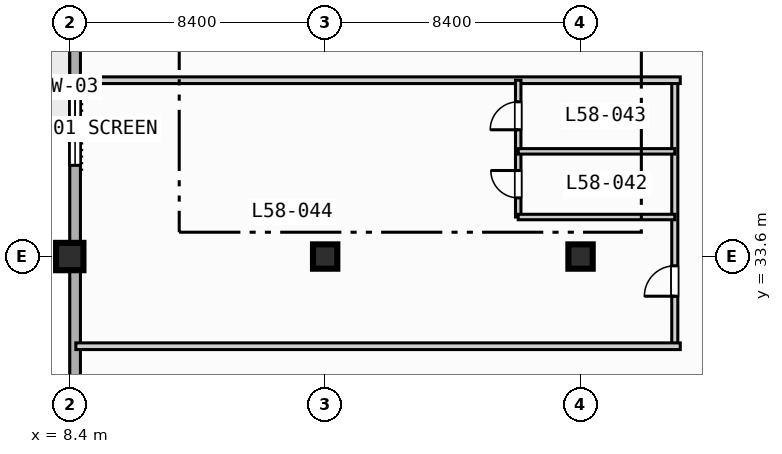
"""IFC4 building model, lengths in metres.
Left out: names, types, materials, properties, quantities, classifications, styles, units other than length and angle.
Written with IfcOpenShell. Run it as: python <this file> out.ifc"""

import sys

from ifc_helpers import new_model, si_unit, direction, frame, frame_2d, origin, origin_2d, place, context, subcontext, project, spatial, rectangle, extrude, element, fill, save


model = new_model("IFC4")
c1 = context("Model", 3, precision=1e-05, world=origin(), true_north=direction((0.0, 1.0)))
c2 = subcontext(c1, "Body", "Model", "MODEL_VIEW")
j1 = project(units=[si_unit("LENGTHUNIT", "METRE"), si_unit("PLANEANGLEUNIT", "RADIAN")], contexts=[c1])
p1 = place(None, origin())
s1 = spatial("IfcSite", under=j1, at=p1, CompositionType="ELEMENT")
p2 = place(p1, origin())
s2 = spatial("IfcBuilding", under=s1, at=p2, CompositionType="ELEMENT")
p3 = place(p2, frame((0.0, 0.0, 237.9)))
s3 = spatial("IfcBuildingStorey", under=s2, at=p3, CompositionType="ELEMENT", Elevation=237.9)
p4 = place(p3, frame((8.4, 33.6, 0.0), z_axis=(0.0, 0.0, 1.0), x_axis=(1.0, 0.0, 0.0)))
e1 = element("IfcColumn", 1, at=p4, inside=s3, PredefinedType="COLUMN", context=c2, shape_type="SweptSolid", body=[
    extrude(rectangle(XDim=0.9, YDim=0.9, at=origin_2d()), origin(), (0.0, 0.0, 1.0), 3.7),
])
for number, where, z_axis, x_axis in (
    (2, (16.8, 33.6, 0.0), (0.0, 0.0, 1.0), (1.0, 0.0, 0.0)),
    (3, (25.2, 33.6, 0.0), (0.0, 0.0, 1.0), (1.0, 0.0, 0.0)),
):
    element("IfcColumn", number, at=place(p3, frame(where, z_axis=z_axis, x_axis=x_axis)), inside=s3, PredefinedType="COLUMN", context=c2, shape_type="SweptSolid", body=[
        extrude(rectangle(XDim=0.8, YDim=0.8, at=origin_2d()), origin(), (0.0, 0.0, 1.0), 3.7),
    ])
p5 = place(p3, frame((8.575, 11.575, 0.0), z_axis=(0.0, 0.0, 1.0), x_axis=(0.0, 1.0, 0.0)))
e4 = element("IfcWall", 4, at=p5, inside=s3, PredefinedType="STANDARD", context=c2, shape_type="SweptSolid", body=[
    extrude(rectangle(XDim=60.85, YDim=0.35, at=frame_2d((30.425, 0.0))), origin(), (0.0, 0.0, 1.0), 3.47),
])
p6 = place(p5, frame((33.925, 0.0, 0.0)))
e5 = element("IfcOpeningElement", 5, at=p6, cuts=e4, PredefinedType="OPENING", context=c2, shape_type="SweptSolid", body=[
    extrude(rectangle(XDim=1.4, YDim=2.2, at=frame_2d((0.7, 1.1))), frame((0.0, 0.185, 0.0), z_axis=(0.0, -1.0, 0.0), x_axis=(1.0, 0.0, 0.0)), (0.0, 0.0, 1.0), 0.37),
])
p7 = place(p5, frame((25.025, 0.0, 0.85)))
e6 = element("IfcOpeningElement", 6, at=p7, cuts=e4, PredefinedType="OPENING", context=c2, shape_type="SweptSolid", body=[
    extrude(rectangle(XDim=2.4, YDim=1.95, at=frame_2d((1.2, 0.975))), frame((0.0, 0.185, 0.0), z_axis=(0.0, -1.0, 0.0), x_axis=(1.0, 0.0, 0.0)), (0.0, 0.0, 1.0), 0.37),
])
p8 = place(p5, frame((41.825, 0.0, 0.85)))
e7 = element("IfcOpeningElement", 7, at=p8, cuts=e4, PredefinedType="OPENING", context=c2, shape_type="SweptSolid", body=[
    extrude(rectangle(XDim=2.4, YDim=1.95, at=frame_2d((1.2, 0.975))), frame((0.0, 0.185, 0.0), z_axis=(0.0, -1.0, 0.0), x_axis=(1.0, 0.0, 0.0)), (0.0, 0.0, 1.0), 0.37),
])
p9 = place(p3, frame((28.3, 30.65, 0.0), z_axis=(0.0, 0.0, 1.0), x_axis=(0.0, 1.0, 0.0)))
e8 = element("IfcWall", 8, at=p9, inside=s3, PredefinedType="PARTITIONING", context=c2, shape_type="SweptSolid", body=[
    extrude(rectangle(XDim=8.75, YDim=0.2, at=frame_2d((4.375, 0.0))), origin(), (0.0, 0.0, 1.0), 3.47),
])
p10 = place(p9, frame((1.645, 0.0, 0.0)))
e9 = element("IfcOpeningElement", 9, at=p10, cuts=e8, PredefinedType="OPENING", context=c2, shape_type="SweptSolid", body=[
    extrude(rectangle(XDim=1.0, YDim=2.15, at=frame_2d((0.5, 1.075))), frame((0.0, 0.11, 0.0), z_axis=(0.0, -1.0, 0.0), x_axis=(1.0, 0.0, 0.0)), (0.0, 0.0, 1.0), 0.22),
])
for number, where, z_axis, x_axis in (
    (10, (8.6, 30.65, 0.0), (0.0, 0.0, 1.0), (1.0, 0.0, 0.0)),
    (11, (8.6, 39.4, 0.0), (0.0, 0.0, 1.0), (1.0, 0.0, 0.0)),
):
    element("IfcWall", number, at=place(p3, frame(where, z_axis=z_axis, x_axis=x_axis)), inside=s3, PredefinedType="PARTITIONING", context=c2, shape_type="SweptSolid", body=[
        extrude(rectangle(XDim=19.88, YDim=0.22, at=frame_2d((9.94, 0.0))), origin(), (0.0, 0.0, 1.0), 3.47),
    ])
p11 = place(p3, frame((23.15, 34.9, 0.0), z_axis=(0.0, 0.0, 1.0), x_axis=(0.0, 1.0, 0.0)))
e12 = element("IfcWall", 12, at=p11, inside=s3, PredefinedType="PLUMBINGWALL", context=c2, shape_type="SweptSolid", body=[
    extrude(rectangle(XDim=4.5, YDim=0.18, at=frame_2d((2.25, 0.0))), origin(), (0.0, 0.0, 1.0), 3.47),
])
p12 = place(p11, frame((0.63, 0.0, 0.0)))
e13 = element("IfcOpeningElement", 13, at=p12, cuts=e12, PredefinedType="OPENING", context=c2, shape_type="SweptSolid", body=[
    extrude(rectangle(XDim=0.9, YDim=2.1, at=frame_2d((0.45, 1.05))), frame((0.0, 0.1, 0.0), z_axis=(0.0, -1.0, 0.0), x_axis=(1.0, 0.0, 0.0)), (0.0, 0.0, 1.0), 0.2),
])
p13 = place(p11, frame((2.87, 0.0, 0.0)))
e14 = element("IfcOpeningElement", 14, at=p13, cuts=e12, PredefinedType="OPENING", context=c2, shape_type="SweptSolid", body=[
    extrude(rectangle(XDim=0.92, YDim=2.1, at=frame_2d((0.46, 1.05))), frame((0.0, 0.1, 0.0), z_axis=(0.0, -1.0, 0.0), x_axis=(1.0, 0.0, 0.0)), (0.0, 0.0, 1.0), 0.2),
])
for number, where, z_axis, x_axis in (
    (15, (23.15, 34.9, 0.0), (0.0, 0.0, 1.0), (1.0, 0.0, 0.0)),
    (16, (23.15, 37.06, 0.0), (0.0, 0.0, 1.0), (1.0, 0.0, 0.0)),
):
    element("IfcWall", number, at=place(p3, frame(where, z_axis=z_axis, x_axis=x_axis)), inside=s3, PredefinedType="PLUMBINGWALL", context=c2, shape_type="SweptSolid", body=[
        extrude(rectangle(XDim=5.15, YDim=0.18, at=frame_2d((2.575, 0.0))), origin(), (0.0, 0.0, 1.0), 3.47),
    ])
p14 = place(p7, origin())
e17 = element("IfcWindow", 17, at=p14, inside=s3, PartitioningType="SINGLE_PANEL", PredefinedType="WINDOW", context=c2, shape_type="SweptSolid", body=[
    extrude(rectangle(XDim=2.4, YDim=1.95, at=frame_2d((1.2, 0.975))), frame((0.0, 0.03, 0.0), z_axis=(0.0, -1.0, 0.0), x_axis=(1.0, 0.0, 0.0)), (0.0, 0.0, 1.0), 0.06),
])
fill(e6, e17)
p15 = place(p10, origin())
e18 = element("IfcDoor", 18, at=p15, inside=s3, OperationType="SINGLE_SWING_LEFT", PredefinedType="DOOR", context=c2, shape_type="SweptSolid", body=[
    extrude(rectangle(XDim=1.0, YDim=2.15, at=frame_2d((0.5, 1.075))), frame((0.0, 0.025, 0.0), z_axis=(0.0, -1.0, 0.0), x_axis=(1.0, 0.0, 0.0)), (0.0, 0.0, 1.0), 0.05),
])
fill(e9, e18)
p16 = place(p12, origin())
e19 = element("IfcDoor", 19, at=p16, inside=s3, OperationType="SINGLE_SWING_RIGHT", PredefinedType="DOOR", context=c2, shape_type="SweptSolid", body=[
    extrude(rectangle(XDim=0.9, YDim=2.1, at=frame_2d((0.45, 1.05))), frame((0.0, 0.025, 0.0), z_axis=(0.0, -1.0, 0.0), x_axis=(1.0, 0.0, 0.0)), (0.0, 0.0, 1.0), 0.05),
])
fill(e13, e19)
p17 = place(p13, origin())
e20 = element("IfcDoor", 20, at=p17, inside=s3, OperationType="SINGLE_SWING_LEFT", PredefinedType="DOOR", context=c2, shape_type="SweptSolid", body=[
    extrude(rectangle(XDim=0.92, YDim=2.1, at=frame_2d((0.46, 1.05))), frame((0.0, 0.025, 0.0), z_axis=(0.0, -1.0, 0.0), x_axis=(1.0, 0.0, 0.0)), (0.0, 0.0, 1.0), 0.05),
])
fill(e14, e20)
save(model, sys.argv[1])
